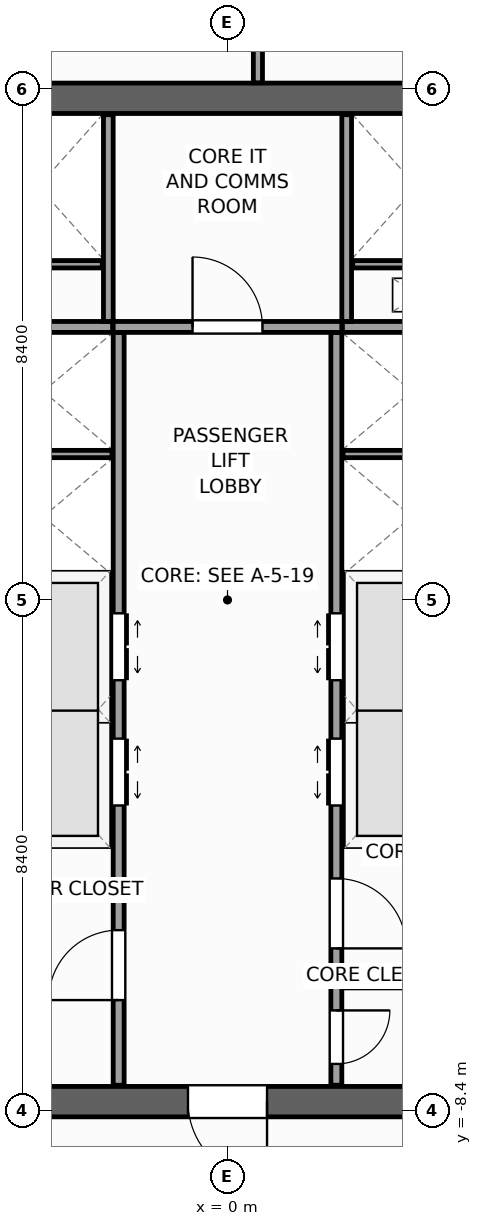
"""IFC4 building model, lengths in metres.
Left out: names, types, materials, properties, quantities, classifications, styles, units other than length and angle.
Written with IfcOpenShell. Run it as: python <this file> out.ifc"""

import sys

from ifc_helpers import new_model, si_unit, direction, frame, frame_2d, origin, place, context, subcontext, project, spatial, rectangle, extrude, source, transform, mapped, element, fill, save


model = new_model("IFC4")
c1 = context("Model", 3, precision=1e-05, world=origin(), true_north=direction((0.0, 1.0)))
c2 = subcontext(c1, "Body", "Model", "MODEL_VIEW")
j1 = project(units=[si_unit("LENGTHUNIT", "METRE"), si_unit("PLANEANGLEUNIT", "RADIAN")], contexts=[c1])
p1 = place(None, origin())
s1 = spatial("IfcSite", under=j1, at=p1, CompositionType="ELEMENT")
p2 = place(p1, origin())
s2 = spatial("IfcBuilding", under=s1, at=p2, CompositionType="ELEMENT")
p3 = place(p2, frame((0.0, 0.0, 205.6)))
s3 = spatial("IfcBuildingStorey", under=s2, at=p3, CompositionType="ELEMENT", Elevation=205.6)
p4 = place(p3, frame((-8.5, -8.25, 0.0), z_axis=(0.0, 0.0, 1.0), x_axis=(1.0, 0.0, 0.0)))
e1 = element("IfcWall", 1, at=p4, inside=s3, PredefinedType="SHEAR", context=c2, shape_type="SweptSolid", body=[
    extrude(rectangle(XDim=17.0, YDim=0.5, at=frame_2d((8.5, 0.0))), origin(), (0.0, 0.0, 1.0), 3.9),
])
p5 = place(p4, frame((7.85, 0.0, 0.0)))
e2 = element("IfcOpeningElement", 2, at=p5, cuts=e1, PredefinedType="OPENING", context=c2, shape_type="SweptSolid", body=[
    extrude(rectangle(XDim=1.3, YDim=2.2, at=frame_2d((0.65, 1.1))), frame((0.0, 0.26, 0.0), z_axis=(0.0, -1.0, 0.0), x_axis=(1.0, 0.0, 0.0)), (0.0, 0.0, 1.0), 0.52),
])
p6 = place(p3, frame((-8.5, 8.25, 0.0), z_axis=(0.0, 0.0, 1.0), x_axis=(1.0, 0.0, 0.0)))
e3 = element("IfcWall", 3, at=p6, inside=s3, PredefinedType="SHEAR", context=c2, shape_type="SweptSolid", body=[
    extrude(rectangle(XDim=17.0, YDim=0.5, at=frame_2d((8.5, 0.0))), origin(), (0.0, 0.0, 1.0), 3.9),
])
p7 = place(p3, frame((29.154, 6.733, 0.0), z_axis=(0.0, 0.0, 1.0), x_axis=(-0.77714192302, 0.629325378072, 0.0)))
e4 = element("IfcWall", 4, at=p7, inside=s3, PredefinedType="STANDARD", context=c2, shape_type="SweptSolid", body=[
    extrude(rectangle(XDim=36.84, YDim=0.34, at=frame_2d((18.42, 0.0))), origin(), (0.0, 0.0, 1.0), 2.96),
])
p8 = place(p7, frame((23.495, 0.0, 0.0)))
e5 = element("IfcOpeningElement", 5, at=p8, cuts=e4, PredefinedType="OPENING", context=c2, shape_type="SweptSolid", body=[
    extrude(rectangle(XDim=1.05, YDim=2.25, at=frame_2d((0.525, 1.125))), frame((0.0, 0.18, 0.0), z_axis=(0.0, -1.0, 0.0), x_axis=(1.0, 0.0, 0.0)), (0.0, 0.0, 1.0), 0.36),
])
p9 = place(p7, frame((3.721, 0.0, 0.48)))
e6 = element("IfcOpeningElement", 6, at=p9, cuts=e4, PredefinedType="OPENING", context=c2, shape_type="SweptSolid", body=[
    extrude(rectangle(XDim=1.4, YDim=2.4, at=frame_2d((0.7, 1.2))), frame((0.0, 0.18, 0.0), z_axis=(0.0, -1.0, 0.0), x_axis=(1.0, 0.0, 0.0)), (0.0, 0.0, 1.0), 0.36),
])
p10 = place(p7, frame((9.809, 0.0, 0.58)))
e7 = element("IfcOpeningElement", 7, at=p10, cuts=e4, PredefinedType="OPENING", context=c2, shape_type="SweptSolid", body=[
    extrude(rectangle(XDim=1.75, YDim=2.3, at=frame_2d((0.875, 1.15))), frame((0.0, 0.18, 0.0), z_axis=(0.0, -1.0, 0.0), x_axis=(1.0, 0.0, 0.0)), (0.0, 0.0, 1.0), 0.36),
])
p11 = place(p7, frame((16.058, 0.0, 0.58)))
e8 = element("IfcOpeningElement", 8, at=p11, cuts=e4, PredefinedType="OPENING", context=c2, shape_type="SweptSolid", body=[
    extrude(rectangle(XDim=1.75, YDim=2.3, at=frame_2d((0.875, 1.15))), frame((0.0, 0.18, 0.0), z_axis=(0.0, -1.0, 0.0), x_axis=(1.0, 0.0, 0.0)), (0.0, 0.0, 1.0), 0.36),
])
p12 = place(p7, frame((25.676, 0.0, 0.58)))
e9 = element("IfcOpeningElement", 9, at=p12, cuts=e4, PredefinedType="OPENING", context=c2, shape_type="SweptSolid", body=[
    extrude(rectangle(XDim=1.75, YDim=2.3, at=frame_2d((0.875, 1.15))), frame((0.0, 0.18, 0.0), z_axis=(0.0, -1.0, 0.0), x_axis=(1.0, 0.0, 0.0)), (0.0, 0.0, 1.0), 0.36),
])
p13 = place(p7, frame((30.982, 0.0, 0.48)))
e10 = element("IfcOpeningElement", 10, at=p13, cuts=e4, PredefinedType="OPENING", context=c2, shape_type="SweptSolid", body=[
    extrude(rectangle(XDim=1.4, YDim=2.4, at=frame_2d((0.7, 1.2))), frame((0.0, 0.18, 0.0), z_axis=(0.0, -1.0, 0.0), x_axis=(1.0, 0.0, 0.0)), (0.0, 0.0, 1.0), 0.36),
])
p14 = place(p3, frame((-29.154, -6.733, 0.0), z_axis=(0.0, 0.0, 1.0), x_axis=(0.77714192302, -0.629325378072, 0.0)))
e11 = element("IfcWall", 11, at=p14, inside=s3, PredefinedType="STANDARD", context=c2, shape_type="SweptSolid", body=[
    extrude(rectangle(XDim=36.84, YDim=0.34, at=frame_2d((18.42, 0.0))), origin(), (0.0, 0.0, 1.0), 2.96),
])
p15 = place(p14, frame((23.495, 0.0, 0.0)))
e12 = element("IfcOpeningElement", 12, at=p15, cuts=e11, PredefinedType="OPENING", context=c2, shape_type="SweptSolid", body=[
    extrude(rectangle(XDim=1.05, YDim=2.25, at=frame_2d((0.525, 1.125))), frame((0.0, 0.18, 0.0), z_axis=(0.0, -1.0, 0.0), x_axis=(1.0, 0.0, 0.0)), (0.0, 0.0, 1.0), 0.36),
])
p16 = place(p14, frame((3.721, 0.0, 0.48)))
e13 = element("IfcOpeningElement", 13, at=p16, cuts=e11, PredefinedType="OPENING", context=c2, shape_type="SweptSolid", body=[
    extrude(rectangle(XDim=1.4, YDim=2.4, at=frame_2d((0.7, 1.2))), frame((0.0, 0.18, 0.0), z_axis=(0.0, -1.0, 0.0), x_axis=(1.0, 0.0, 0.0)), (0.0, 0.0, 1.0), 0.36),
])
p17 = place(p14, frame((9.809, 0.0, 0.58)))
e14 = element("IfcOpeningElement", 14, at=p17, cuts=e11, PredefinedType="OPENING", context=c2, shape_type="SweptSolid", body=[
    extrude(rectangle(XDim=1.75, YDim=2.3, at=frame_2d((0.875, 1.15))), frame((0.0, 0.18, 0.0), z_axis=(0.0, -1.0, 0.0), x_axis=(1.0, 0.0, 0.0)), (0.0, 0.0, 1.0), 0.36),
])
p18 = place(p14, frame((16.058, 0.0, 0.58)))
e15 = element("IfcOpeningElement", 15, at=p18, cuts=e11, PredefinedType="OPENING", context=c2, shape_type="SweptSolid", body=[
    extrude(rectangle(XDim=1.75, YDim=2.3, at=frame_2d((0.875, 1.15))), frame((0.0, 0.18, 0.0), z_axis=(0.0, -1.0, 0.0), x_axis=(1.0, 0.0, 0.0)), (0.0, 0.0, 1.0), 0.36),
])
p19 = place(p14, frame((25.676, 0.0, 0.58)))
e16 = element("IfcOpeningElement", 16, at=p19, cuts=e11, PredefinedType="OPENING", context=c2, shape_type="SweptSolid", body=[
    extrude(rectangle(XDim=1.75, YDim=2.3, at=frame_2d((0.875, 1.15))), frame((0.0, 0.18, 0.0), z_axis=(0.0, -1.0, 0.0), x_axis=(1.0, 0.0, 0.0)), (0.0, 0.0, 1.0), 0.36),
])
p20 = place(p14, frame((30.982, 0.0, 0.48)))
e17 = element("IfcOpeningElement", 17, at=p20, cuts=e11, PredefinedType="OPENING", context=c2, shape_type="SweptSolid", body=[
    extrude(rectangle(XDim=1.4, YDim=2.4, at=frame_2d((0.7, 1.2))), frame((0.0, 0.18, 0.0), z_axis=(0.0, -1.0, 0.0), x_axis=(1.0, 0.0, 0.0)), (0.0, 0.0, 1.0), 0.36),
])
p21 = place(p3, frame((-1.79, -7.98, 0.0), z_axis=(0.0, 0.0, 1.0), x_axis=(0.0, 1.0, 0.0)))
e18 = element("IfcWall", 18, at=p21, inside=s3, PredefinedType="PARTITIONING", context=c2, shape_type="SweptSolid", body=[
    extrude(rectangle(XDim=12.38, YDim=0.18, at=frame_2d((6.19, 0.0))), origin(), (0.0, 0.0, 1.0), 3.66),
])
p22 = place(p21, frame((4.6, 0.0, 0.0)))
e19 = element("IfcOpeningElement", 19, at=p22, cuts=e18, PredefinedType="OPENING", context=c2, shape_type="SweptSolid", body=[
    extrude(rectangle(XDim=1.1, YDim=2.2, at=frame_2d((0.55, 1.1))), frame((0.0, 0.1, 0.0), z_axis=(0.0, -1.0, 0.0), x_axis=(1.0, 0.0, 0.0)), (0.0, 0.0, 1.0), 0.2),
])
p23 = place(p21, frame((6.66, 0.0, 0.0)))
e20 = element("IfcOpeningElement", 20, at=p23, cuts=e18, PredefinedType="OPENING", context=c2, shape_type="SweptSolid", body=[
    extrude(rectangle(XDim=1.1, YDim=2.2, at=frame_2d((0.55, 1.1))), frame((0.0, 0.1, 0.0), z_axis=(0.0, -1.0, 0.0), x_axis=(1.0, 0.0, 0.0)), (0.0, 0.0, 1.0), 0.2),
])
p24 = place(p21, frame((1.4, 0.0, 0.0)))
e21 = element("IfcOpeningElement", 21, at=p24, cuts=e18, PredefinedType="OPENING", context=c2, shape_type="SweptSolid", body=[
    extrude(rectangle(XDim=1.15, YDim=2.25, at=frame_2d((0.575, 1.125))), frame((0.0, 0.1, 0.0), z_axis=(0.0, -1.0, 0.0), x_axis=(1.0, 0.0, 0.0)), (0.0, 0.0, 1.0), 0.2),
])
p25 = place(p3, frame((1.79, -7.98, 0.0), z_axis=(0.0, 0.0, 1.0), x_axis=(0.0, 1.0, 0.0)))
e22 = element("IfcWall", 22, at=p25, inside=s3, PredefinedType="PARTITIONING", context=c2, shape_type="SweptSolid", body=[
    extrude(rectangle(XDim=12.38, YDim=0.18, at=frame_2d((6.19, 0.0))), origin(), (0.0, 0.0, 1.0), 3.66),
])
p26 = place(p25, frame((4.6, 0.0, 0.0)))
e23 = element("IfcOpeningElement", 23, at=p26, cuts=e22, PredefinedType="OPENING", context=c2, shape_type="SweptSolid", body=[
    extrude(rectangle(XDim=1.1, YDim=2.2, at=frame_2d((0.55, 1.1))), frame((0.0, 0.1, 0.0), z_axis=(0.0, -1.0, 0.0), x_axis=(1.0, 0.0, 0.0)), (0.0, 0.0, 1.0), 0.2),
])
p27 = place(p25, frame((6.66, 0.0, 0.0)))
e24 = element("IfcOpeningElement", 24, at=p27, cuts=e22, PredefinedType="OPENING", context=c2, shape_type="SweptSolid", body=[
    extrude(rectangle(XDim=1.1, YDim=2.2, at=frame_2d((0.55, 1.1))), frame((0.0, 0.1, 0.0), z_axis=(0.0, -1.0, 0.0), x_axis=(1.0, 0.0, 0.0)), (0.0, 0.0, 1.0), 0.2),
])
p28 = place(p25, frame((0.35, 0.0, 0.0)))
e25 = element("IfcOpeningElement", 25, at=p28, cuts=e22, PredefinedType="OPENING", context=c2, shape_type="SweptSolid", body=[
    extrude(rectangle(XDim=0.88, YDim=2.1, at=frame_2d((0.44, 1.05))), frame((0.0, 0.1, 0.0), z_axis=(0.0, -1.0, 0.0), x_axis=(1.0, 0.0, 0.0)), (0.0, 0.0, 1.0), 0.2),
])
p29 = place(p25, frame((2.25, 0.0, 0.0)))
e26 = element("IfcOpeningElement", 26, at=p29, cuts=e22, PredefinedType="OPENING", context=c2, shape_type="SweptSolid", body=[
    extrude(rectangle(XDim=1.15, YDim=2.25, at=frame_2d((0.575, 1.125))), frame((0.0, 0.1, 0.0), z_axis=(0.0, -1.0, 0.0), x_axis=(1.0, 0.0, 0.0)), (0.0, 0.0, 1.0), 0.2),
])
p30 = place(p3, frame((-1.88, 4.49, 0.0), z_axis=(0.0, 0.0, 1.0), x_axis=(1.0, 0.0, 0.0)))
e27 = element("IfcWall", 27, at=p30, inside=s3, PredefinedType="PARTITIONING", context=c2, shape_type="SweptSolid", body=[
    extrude(rectangle(XDim=3.76, YDim=0.18, at=frame_2d((1.88, 0.0))), origin(), (0.0, 0.0, 1.0), 3.66),
])
p31 = place(p30, frame((1.305, 0.0, 0.0)))
e28 = element("IfcOpeningElement", 28, at=p31, cuts=e27, PredefinedType="OPENING", context=c2, shape_type="SweptSolid", body=[
    extrude(rectangle(XDim=1.15, YDim=2.25, at=frame_2d((0.575, 1.125))), frame((0.0, 0.1, 0.0), z_axis=(0.0, -1.0, 0.0), x_axis=(1.0, 0.0, 0.0)), (0.0, 0.0, 1.0), 0.2),
])
for number, where, z_axis, x_axis in (
    (29, (-4.17, -3.9, 0.0), (0.0, 0.0, 1.0), (1.0, 0.0, 0.0)),
    (30, (1.89, -3.9, 0.0), (0.0, 0.0, 1.0), (1.0, 0.0, 0.0)),
    (31, (-4.17, 0.3, 0.0), (0.0, 0.0, 1.0), (1.0, 0.0, 0.0)),
    (32, (1.89, 0.3, 0.0), (0.0, 0.0, 1.0), (1.0, 0.0, 0.0)),
    (33, (-4.17, 4.49, 0.0), (0.0, 0.0, 1.0), (1.0, 0.0, 0.0)),
    (34, (1.89, 4.49, 0.0), (0.0, 0.0, 1.0), (1.0, 0.0, 0.0)),
):
    element("IfcWall", number, at=place(p3, frame(where, z_axis=z_axis, x_axis=x_axis)), inside=s3, PredefinedType="PARTITIONING", context=c2, shape_type="SweptSolid", body=[
        extrude(rectangle(XDim=2.28, YDim=0.18, at=frame_2d((1.14, 0.0))), origin(), (0.0, 0.0, 1.0), 3.66),
    ])
for number, where, z_axis, x_axis in (
    (35, (-4.16, -1.8, 0.0), (0.0, 0.0, 1.0), (1.0, 0.0, 0.0)),
    (36, (1.9, -1.8, 0.0), (0.0, 0.0, 1.0), (1.0, 0.0, 0.0)),
    (37, (-4.16, 2.4, 0.0), (0.0, 0.0, 1.0), (1.0, 0.0, 0.0)),
    (38, (1.9, 2.4, 0.0), (0.0, 0.0, 1.0), (1.0, 0.0, 0.0)),
):
    element("IfcWall", number, at=place(p3, frame(where, z_axis=z_axis, x_axis=x_axis)), inside=s3, PredefinedType="PARTITIONING", context=c2, shape_type="SweptSolid", body=[
        extrude(rectangle(XDim=2.26, YDim=0.12, at=frame_2d((1.13, 0.0))), origin(), (0.0, 0.0, 1.0), 3.66),
    ])
p32 = place(p3, frame((1.89, -6.3, 0.0), z_axis=(0.0, 0.0, 1.0), x_axis=(1.0, 0.0, 0.0)))
e39 = element("IfcWall", 39, at=p32, inside=s3, PredefinedType="PARTITIONING", context=c2, shape_type="SweptSolid", body=[
    extrude(rectangle(XDim=2.28, YDim=0.16, at=frame_2d((1.14, 0.0))), origin(), (0.0, 0.0, 1.0), 3.66),
])
for number, where, z_axis, x_axis in (
    (40, (-1.96, 4.58, 0.0), (0.0, 0.0, 1.0), (0.0, 1.0, 0.0)),
    (41, (1.96, 4.58, 0.0), (0.0, 0.0, 1.0), (0.0, 1.0, 0.0)),
):
    element("IfcWall", number, at=place(p3, frame(where, z_axis=z_axis, x_axis=x_axis)), inside=s3, PredefinedType="PARTITIONING", context=c2, shape_type="SweptSolid", body=[
        extrude(rectangle(XDim=3.4, YDim=0.16, at=frame_2d((1.7, 0.0))), origin(), (0.0, 0.0, 1.0), 3.66),
    ])
for number, where, z_axis, x_axis in (
    (42, (-4.16, 5.52, 0.0), (0.0, 0.0, 1.0), (1.0, 0.0, 0.0)),
    (43, (2.06, 5.52, 0.0), (0.0, 0.0, 1.0), (1.0, 0.0, 0.0)),
):
    element("IfcWall", number, at=place(p3, frame(where, z_axis=z_axis, x_axis=x_axis)), inside=s3, PredefinedType="PARTITIONING", context=c2, shape_type="SweptSolid", body=[
        extrude(rectangle(XDim=2.1, YDim=0.12, at=frame_2d((1.05, 0.0))), origin(), (0.0, 0.0, 1.0), 3.66),
    ])
p33 = place(p3, frame((0.5, 8.505, 0.0), z_axis=(0.0, 0.0, 1.0), x_axis=(0.0, 1.0, 0.0)))
e44 = element("IfcWall", 44, at=p33, inside=s3, PredefinedType="PARTITIONING", context=c2, shape_type="SweptSolid", body=[
    extrude(rectangle(XDim=20.675, YDim=0.15, at=frame_2d((10.337, 0.0))), origin(), (0.0, 0.0, 1.0), 3.66),
])
m1 = source(origin(), c2, "Body", "SweptSolid", [
    extrude(rectangle(XDim=1.3, YDim=2.2, at=frame_2d((0.65, 1.1))), frame((0.0, 0.025, 0.0), z_axis=(0.0, -1.0, 0.0), x_axis=(1.0, 0.0, 0.0)), (0.0, 0.0, 1.0), 0.05),
])
p34 = place(p5, frame((1.3, 0.0, 0.0), z_axis=(0.0, 0.0, 1.0), x_axis=(-1.0, 0.0, 0.0)))
e45 = element("IfcDoor", 45, at=p34, inside=s3, OperationType="SINGLE_SWING_RIGHT", PredefinedType="DOOR", context=c2, shape_type="MappedRepresentation", body=[
    mapped(m1, transform((0.0, 0.0, 0.0), scale=1.0)),
])
fill(e2, e45)
m2 = source(origin(), c2, "Body", "SweptSolid", [
    extrude(rectangle(XDim=1.1, YDim=2.2, at=frame_2d((0.55, 1.1))), frame((0.0, 0.025, 0.0), z_axis=(0.0, -1.0, 0.0), x_axis=(1.0, 0.0, 0.0)), (0.0, 0.0, 1.0), 0.05),
])
p35 = place(p22, frame((1.1, 0.0, 0.0), z_axis=(0.0, 0.0, 1.0), x_axis=(-1.0, 0.0, 0.0)))
e46 = element("IfcDoor", 46, at=p35, inside=s3, OperationType="DOUBLE_DOOR_SLIDING", PredefinedType="DOOR", context=c2, shape_type="MappedRepresentation", body=[
    mapped(m2, transform((0.0, 0.0, 0.0), scale=1.0)),
])
fill(e19, e46)
p36 = place(p23, frame((1.1, 0.0, 0.0), z_axis=(0.0, 0.0, 1.0), x_axis=(-1.0, 0.0, 0.0)))
e47 = element("IfcDoor", 47, at=p36, inside=s3, OperationType="DOUBLE_DOOR_SLIDING", PredefinedType="DOOR", context=c2, shape_type="MappedRepresentation", body=[
    mapped(m2, transform((0.0, 0.0, 0.0), scale=1.0)),
])
fill(e20, e47)
p37 = place(p26, origin())
e48 = element("IfcDoor", 48, at=p37, inside=s3, OperationType="DOUBLE_DOOR_SLIDING", PredefinedType="DOOR", context=c2, shape_type="MappedRepresentation", body=[
    mapped(m2, transform((0.0, 0.0, 0.0), scale=1.0)),
])
fill(e23, e48)
p38 = place(p27, origin())
e49 = element("IfcDoor", 49, at=p38, inside=s3, OperationType="DOUBLE_DOOR_SLIDING", PredefinedType="DOOR", context=c2, shape_type="MappedRepresentation", body=[
    mapped(m2, transform((0.0, 0.0, 0.0), scale=1.0)),
])
fill(e24, e49)
m3 = source(origin(), c2, "Body", "SweptSolid", [
    extrude(rectangle(XDim=1.15, YDim=2.25, at=frame_2d((0.575, 1.125))), frame((0.0, 0.025, 0.0), z_axis=(0.0, -1.0, 0.0), x_axis=(1.0, 0.0, 0.0)), (0.0, 0.0, 1.0), 0.05),
])
p39 = place(p24, origin())
e50 = element("IfcDoor", 50, at=p39, inside=s3, OperationType="SINGLE_SWING_LEFT", PredefinedType="DOOR", context=c2, shape_type="MappedRepresentation", body=[
    mapped(m3, transform((0.0, 0.0, 0.0), scale=1.0)),
])
fill(e21, e50)
m4 = source(origin(), c2, "Body", "SweptSolid", [
    extrude(rectangle(XDim=0.88, YDim=2.1, at=frame_2d((0.44, 1.05))), frame((0.0, 0.025, 0.0), z_axis=(0.0, -1.0, 0.0), x_axis=(1.0, 0.0, 0.0)), (0.0, 0.0, 1.0), 0.05),
])
p40 = place(p28, frame((0.88, 0.0, 0.0), z_axis=(0.0, 0.0, 1.0), x_axis=(-1.0, 0.0, 0.0)))
e51 = element("IfcDoor", 51, at=p40, inside=s3, OperationType="SINGLE_SWING_RIGHT", PredefinedType="DOOR", context=c2, shape_type="MappedRepresentation", body=[
    mapped(m4, transform((0.0, 0.0, 0.0), scale=1.0)),
])
fill(e25, e51)
p41 = place(p29, frame((1.15, 0.0, 0.0), z_axis=(0.0, 0.0, 1.0), x_axis=(-1.0, 0.0, 0.0)))
e52 = element("IfcDoor", 52, at=p41, inside=s3, OperationType="SINGLE_SWING_LEFT", PredefinedType="DOOR", context=c2, shape_type="MappedRepresentation", body=[
    mapped(m3, transform((0.0, 0.0, 0.0), scale=1.0)),
])
fill(e26, e52)
p42 = place(p31, origin())
e53 = element("IfcDoor", 53, at=p42, inside=s3, OperationType="SINGLE_SWING_LEFT", PredefinedType="DOOR", context=c2, shape_type="MappedRepresentation", body=[
    mapped(m3, transform((0.0, 0.0, 0.0), scale=1.0)),
])
fill(e28, e53)
save(model, sys.argv[1])
